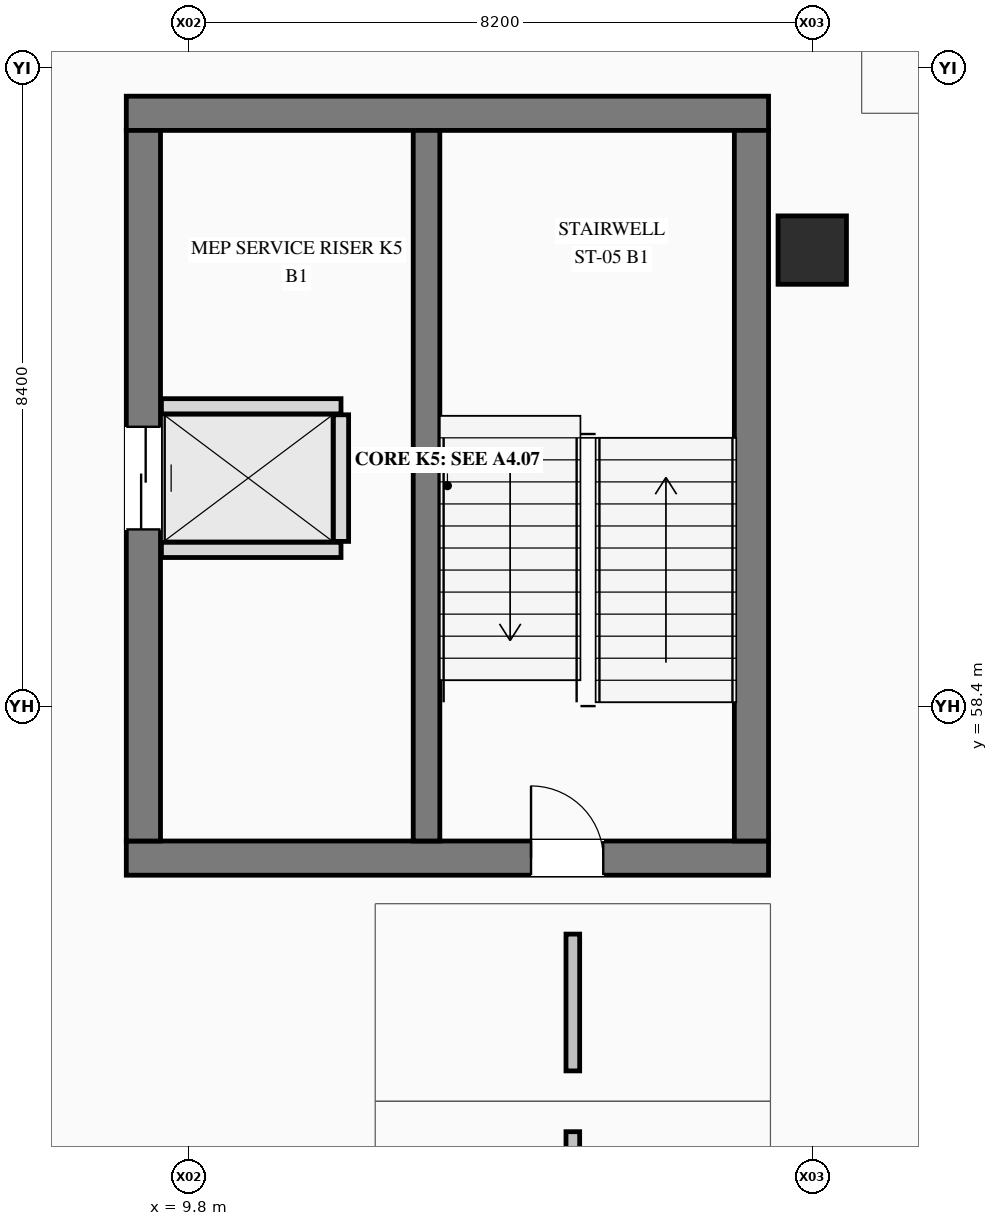
"""IFC4 building model, lengths in metres.
Left out: names, types, materials, properties, quantities, classifications, styles, units other than length and angle.
Written with IfcOpenShell. Run it as: python <this file> out.ifc"""

import sys

from ifc_helpers import new_model, si_unit, direction, frame, frame_2d, origin, origin_2d, place, context, subcontext, project, spatial, rectangle, extrude, element, fill, save


model = new_model("IFC4")
c1 = context("Model", 3, precision=1e-05, world=origin(), true_north=direction((0.0, 1.0)))
c2 = subcontext(c1, "Body", "Model", "MODEL_VIEW")
j1 = project(units=[si_unit("LENGTHUNIT", "METRE"), si_unit("PLANEANGLEUNIT", "RADIAN")], contexts=[c1])
p1 = place(None, origin())
s1 = spatial("IfcSite", under=j1, at=p1, CompositionType="ELEMENT")
p2 = place(p1, origin())
s2 = spatial("IfcBuilding", under=s1, at=p2, CompositionType="ELEMENT")
p3 = place(p2, frame((0.0, 0.0, -4.5)))
s3 = spatial("IfcBuildingStorey", under=s2, at=p3, CompositionType="ELEMENT", Elevation=-4.5)
p4 = place(p3, frame((18.0, 64.4, 0.0), z_axis=(0.0, 0.0, 1.0), x_axis=(1.0, 0.0, 0.0)))
e1 = element("IfcColumn", 1, at=p4, inside=s3, PredefinedType="COLUMN", context=c2, shape_type="SweptSolid", body=[
    extrude(rectangle(XDim=0.9, YDim=0.9, at=origin_2d()), origin(), (0.0, 0.0, 1.0), 4.5),
])
p5 = place(p3, frame((8.975, 56.4, 0.0), z_axis=(0.0, 0.0, 1.0), x_axis=(1.0, 0.0, 0.0)))
e2 = element("IfcWall", 2, at=p5, inside=s3, PredefinedType="SHEAR", context=c2, shape_type="SweptSolid", body=[
    extrude(rectangle(XDim=8.45, YDim=0.45, at=frame_2d((4.225, 0.0))), origin(), (0.0, 0.0, 1.0), 4.5),
])
p6 = place(p5, frame((5.325, 0.0, 0.0)))
e3 = element("IfcOpeningElement", 3, at=p6, cuts=e2, PredefinedType="OPENING", context=c2, shape_type="SweptSolid", body=[
    extrude(rectangle(XDim=0.95, YDim=2.2, at=frame_2d((0.475, 1.1))), frame((0.0, 0.235, 0.0), z_axis=(0.0, -1.0, 0.0), x_axis=(1.0, 0.0, 0.0)), (0.0, 0.0, 1.0), 0.47),
])
p7 = place(p3, frame((17.425, 66.2, 0.0), z_axis=(0.0, 0.0, 1.0), x_axis=(-1.0, 0.0, 0.0)))
e4 = element("IfcWall", 4, at=p7, inside=s3, PredefinedType="SHEAR", context=c2, shape_type="SweptSolid", body=[
    extrude(rectangle(XDim=8.45, YDim=0.45, at=frame_2d((4.225, 0.0))), origin(), (0.0, 0.0, 1.0), 4.5),
])
p8 = place(p3, frame((9.2, 65.975, 0.0), z_axis=(0.0, 0.0, 1.0), x_axis=(0.0, -1.0, 0.0)))
e5 = element("IfcWall", 5, at=p8, inside=s3, PredefinedType="SHEAR", context=c2, shape_type="SweptSolid", body=[
    extrude(rectangle(XDim=9.35, YDim=0.45, at=frame_2d((4.675, 0.0))), origin(), (0.0, 0.0, 1.0), 4.5),
])
p9 = place(p8, frame((3.9, 0.0, 0.0)))
e6 = element("IfcOpeningElement", 6, at=p9, cuts=e5, PredefinedType="OPENING", context=c2, shape_type="SweptSolid", body=[
    extrude(rectangle(XDim=1.35, YDim=2.3, at=frame_2d((0.675, 1.15))), frame((0.0, 0.235, 0.0), z_axis=(0.0, -1.0, 0.0), x_axis=(1.0, 0.0, 0.0)), (0.0, 0.0, 1.0), 0.47),
])
p10 = place(p3, frame((17.2, 56.625, 0.0), z_axis=(0.0, 0.0, 1.0), x_axis=(0.0, 1.0, 0.0)))
e7 = element("IfcWall", 7, at=p10, inside=s3, PredefinedType="SHEAR", context=c2, shape_type="SweptSolid", body=[
    extrude(rectangle(XDim=9.35, YDim=0.45, at=frame_2d((4.675, 0.0))), origin(), (0.0, 0.0, 1.0), 4.5),
])
p11 = place(p3, frame((12.925, 56.625, 0.0), z_axis=(0.0, 0.0, 1.0), x_axis=(0.0, 1.0, 0.0)))
e8 = element("IfcWall", 8, at=p11, inside=s3, PredefinedType="SHEAR", context=c2, shape_type="SweptSolid", body=[
    extrude(rectangle(XDim=9.35, YDim=0.35, at=frame_2d((4.675, 0.0))), origin(), (0.0, 0.0, 1.0), 4.5),
])
for number, where, z_axis, x_axis in (
    (9, (9.437, 60.455, 0.0), (0.0, 0.0, 1.0), (1.0, 0.0, 0.0)),
    (10, (9.437, 62.345, 0.0), (0.0, 0.0, 1.0), (1.0, 0.0, 0.0)),
):
    element("IfcWall", number, at=place(p3, frame(where, z_axis=z_axis, x_axis=x_axis)), inside=s3, PredefinedType="PLUMBINGWALL", context=c2, shape_type="SweptSolid", body=[
        extrude(rectangle(XDim=2.363, YDim=0.2, at=frame_2d((1.182, 0.0))), origin(), (0.0, 0.0, 1.0), 4.175),
    ])
p12 = place(p3, frame((11.8, 60.567, 0.0), z_axis=(0.0, 0.0, 1.0), x_axis=(0.0, 1.0, 0.0)))
e11 = element("IfcWall", 11, at=p12, inside=s3, PredefinedType="PLUMBINGWALL", context=c2, shape_type="SweptSolid", body=[
    extrude(rectangle(XDim=1.666, YDim=0.2, at=frame_2d((0.833, 0.0))), origin(), (0.0, 0.0, 1.0), 4.175),
])
p13 = place(p6, origin())
e12 = element("IfcDoor", 12, at=p13, inside=s3, OperationType="SINGLE_SWING_LEFT", PredefinedType="DOOR", context=c2, shape_type="SweptSolid", body=[
    extrude(rectangle(XDim=0.95, YDim=2.2, at=frame_2d((0.475, 1.1))), frame((0.0, 0.025, 0.0), z_axis=(0.0, -1.0, 0.0), x_axis=(1.0, 0.0, 0.0)), (0.0, 0.0, 1.0), 0.05),
])
fill(e3, e12)
p14 = place(p9, origin())
e13 = element("IfcDoor", 13, at=p14, inside=s3, OperationType="SLIDING_TO_LEFT", PredefinedType="DOOR", context=c2, shape_type="SweptSolid", body=[
    extrude(rectangle(XDim=1.35, YDim=2.3, at=frame_2d((0.675, 1.15))), frame((0.0, 0.025, 0.0), z_axis=(0.0, -1.0, 0.0), x_axis=(1.0, 0.0, 0.0)), (0.0, 0.0, 1.0), 0.05),
])
fill(e6, e13)
save(model, sys.argv[1])
